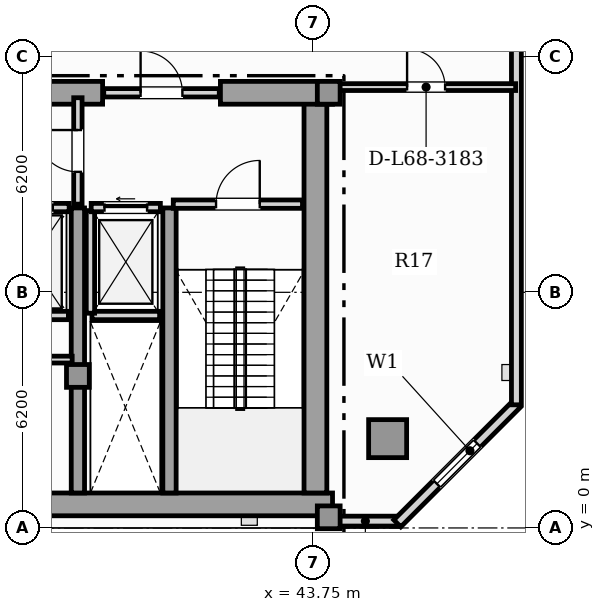
"""IFC4 building model, lengths in metres.
Left out: names, types, materials, properties, quantities, classifications, styles, units other than length and angle.
Written with IfcOpenShell. Run it as: python <this file> out.ifc"""

import sys

from ifc_helpers import new_model, si_unit, direction, frame, frame_2d, origin, origin_2d, place, context, subcontext, project, spatial, rectangle, hollow_rectangle, extrude, element, fill, save


model = new_model("IFC4")
c1 = context("Model", 3, precision=1e-05, world=origin(), true_north=direction((0.0, 1.0)))
c2 = subcontext(c1, "Body", "Model", "MODEL_VIEW")
j1 = project(units=[si_unit("LENGTHUNIT", "METRE"), si_unit("PLANEANGLEUNIT", "RADIAN")], contexts=[c1])
p1 = place(None, origin())
s1 = spatial("IfcSite", under=j1, at=p1, CompositionType="ELEMENT")
p2 = place(p1, origin())
s2 = spatial("IfcBuilding", under=s1, at=p2, CompositionType="ELEMENT")
p3 = place(p2, frame((0.0, 0.0, 276.0)))
s3 = spatial("IfcBuildingStorey", under=s2, at=p3, CompositionType="ELEMENT", Elevation=276.0)
p4 = place(p3, frame((13.25, 0.62, 0.0), z_axis=(0.0, 0.0, 1.0), x_axis=(1.0, 0.0, 0.0)))
e1 = element("IfcWall", 1, at=p4, inside=s3, PredefinedType="SHEAR", context=c2, shape_type="SweptSolid", body=[
    extrude(rectangle(XDim=31.0, YDim=0.6, at=frame_2d((15.5, 0.0))), origin(), (0.0, 0.0, 1.0), 4.85),
])
p5 = place(p3, frame((43.8, 0.92, 0.0), z_axis=(0.0, 0.0, 1.0), x_axis=(0.0, 1.0, 0.0)))
e2 = element("IfcWall", 2, at=p5, inside=s3, PredefinedType="SHEAR", context=c2, shape_type="SweptSolid", body=[
    extrude(rectangle(XDim=10.53, YDim=0.6, at=frame_2d((5.265, 0.0))), origin(), (0.0, 0.0, 1.0), 4.85),
])
p6 = place(p3, frame((30.9, 11.45, 0.0), z_axis=(0.0, 0.0, 1.0), x_axis=(1.0, 0.0, 0.0)))
e3 = element("IfcWall", 3, at=p6, inside=s3, PredefinedType="SHEAR", context=c2, shape_type="SweptSolid", body=[
    extrude(rectangle(XDim=7.3, YDim=0.6, at=frame_2d((3.65, 0.0))), origin(), (0.0, 0.0, 1.0), 4.85),
])
p7 = place(p3, frame((41.3, 11.45, 0.0), z_axis=(0.0, 0.0, 1.0), x_axis=(1.0, 0.0, 0.0)))
e4 = element("IfcWall", 4, at=p7, inside=s3, PredefinedType="SHEAR", context=c2, shape_type="SweptSolid", body=[
    extrude(rectangle(XDim=2.95, YDim=0.6, at=frame_2d((1.475, 0.0))), origin(), (0.0, 0.0, 1.0), 4.85),
])
for number, where, z_axis, x_axis in (
    (5, (37.55, 0.92, 0.0), (0.0, 0.0, 1.0), (0.0, 1.0, 0.0)),
    (6, (39.96, 0.92, 0.0), (0.0, 0.0, 1.0), (0.0, 1.0, 0.0)),
):
    element("IfcWall", number, at=place(p3, frame(where, z_axis=z_axis, x_axis=x_axis)), inside=s3, PredefinedType="SHEAR", context=c2, shape_type="SweptSolid", body=[
        extrude(rectangle(XDim=7.5, YDim=0.35, at=frame_2d((3.75, 0.0))), origin(), (0.0, 0.0, 1.0), 4.85),
    ])
for number, where, z_axis, x_axis in (
    (7, (44.15, 0.28, 0.0), (0.0, 0.0, 1.0), (1.0, 0.0, 0.0)),
    (8, (44.15, 11.45, 0.0), (0.0, 0.0, 1.0), (1.0, 0.0, 0.0)),
    (9, (37.55, 4.0, 0.0), (0.0, 0.0, 1.0), (1.0, 0.0, 0.0)),
):
    element("IfcColumn", number, at=place(p3, frame(where, z_axis=z_axis, x_axis=x_axis)), inside=s3, PredefinedType="COLUMN", context=c2, shape_type="SweptSolid", body=[
        extrude(rectangle(XDim=0.6, YDim=0.6, at=origin_2d()), origin(), (0.0, 0.0, 1.0), 5.05),
    ])
p8 = place(p3, frame((45.7, 2.35, 0.0), z_axis=(0.0, 0.0, 1.0), x_axis=(1.0, 0.0, 0.0)))
e10 = element("IfcColumn", 10, at=p8, inside=s3, PredefinedType="USERDEFINED", context=c2, shape_type="SweptSolid", body=[
    extrude(hollow_rectangle(XDim=1.0, YDim=1.0, WallThickness=0.06, at=origin_2d()), origin(), (0.0, 0.0, 1.0), 5.05),
])
p9 = place(p3, frame((44.25, 0.18, 0.0), z_axis=(0.0, 0.0, 1.0), x_axis=(1.0, 0.0, 0.0)))
e11 = element("IfcWall", 11, at=p9, inside=s3, PredefinedType="SOLIDWALL", context=c2, shape_type="SweptSolid", body=[
    extrude(rectangle(XDim=1.728, YDim=0.26, at=frame_2d((0.864, 0.0))), origin(), (0.0, 0.0, 1.0), 4.85),
])
p10 = place(p3, frame((45.954, 0.12, 0.0), z_axis=(0.0, 0.0, 1.0), x_axis=(0.707106781187, 0.707106781187, 0.0)))
e12 = element("IfcWall", 12, at=p10, inside=s3, PredefinedType="SOLIDWALL", context=c2, shape_type="SweptSolid", body=[
    extrude(rectangle(XDim=4.446, YDim=0.26, at=frame_2d((2.223, 0.0))), origin(), (0.0, 0.0, 1.0), 4.85),
])
p11 = place(p10, frame((1.473, 0.0, 0.9)))
e13 = element("IfcOpeningElement", 13, at=p11, cuts=e12, PredefinedType="OPENING", context=c2, shape_type="SweptSolid", body=[
    extrude(rectangle(XDim=1.5, YDim=1.95, at=frame_2d((0.75, 0.975))), frame((0.0, 0.14, 0.0), z_axis=(0.0, -1.0, 0.0), x_axis=(1.0, 0.0, 0.0)), (0.0, 0.0, 1.0), 0.28),
])
p12 = place(p3, frame((49.088, 3.24, 0.0), z_axis=(0.0, 0.0, 1.0), x_axis=(0.0, 1.0, 0.0)))
e14 = element("IfcWall", 14, at=p12, inside=s3, PredefinedType="SOLIDWALL", context=c2, shape_type="SweptSolid", body=[
    extrude(rectangle(XDim=15.289, YDim=0.26, at=frame_2d((7.645, 0.0))), origin(), (0.0, 0.0, 1.0), 4.85),
])
p13 = place(p12, frame((12.739, 0.0, 0.95)))
e15 = element("IfcOpeningElement", 15, at=p13, cuts=e14, PredefinedType="OPENING", context=c2, shape_type="SweptSolid", body=[
    extrude(rectangle(XDim=0.9, YDim=1.5, at=frame_2d((0.45, 0.75))), frame((0.0, 0.14, 0.0), z_axis=(0.0, -1.0, 0.0), x_axis=(1.0, 0.0, 0.0)), (0.0, 0.0, 1.0), 0.28),
])
p14 = place(p3, frame((37.92, 5.59, 0.0), z_axis=(0.0, 0.0, 1.0), x_axis=(1.0, 0.0, 0.0)))
e16 = element("IfcWall", 16, at=p14, inside=s3, PredefinedType="SOLIDWALL", context=c2, shape_type="SweptSolid", body=[
    extrude(rectangle(XDim=1.78, YDim=0.22, at=frame_2d((0.89, 0.0))), origin(), (0.0, 0.0, 1.0), 4.85),
])
p15 = place(p3, frame((37.88, 5.65, 0.0), z_axis=(0.0, 0.0, 1.0), x_axis=(0.0, 1.0, 0.0)))
e17 = element("IfcWall", 17, at=p15, inside=s3, PredefinedType="SOLIDWALL", context=c2, shape_type="SweptSolid", body=[
    extrude(rectangle(XDim=2.7, YDim=0.22, at=frame_2d((1.35, 0.0))), origin(), (0.0, 0.0, 1.0), 4.85),
])
p16 = place(p3, frame((37.9, 8.43, 0.0), z_axis=(0.0, 0.0, 1.0), x_axis=(1.0, 0.0, 0.0)))
e18 = element("IfcWall", 18, at=p16, inside=s3, PredefinedType="SOLIDWALL", context=c2, shape_type="SweptSolid", body=[
    extrude(rectangle(XDim=1.82, YDim=0.22, at=frame_2d((0.91, 0.0))), origin(), (0.0, 0.0, 1.0), 4.85),
])
p17 = place(p16, frame((0.35, 0.0, 0.0)))
e19 = element("IfcOpeningElement", 19, at=p17, cuts=e18, PredefinedType="OPENING", context=c2, shape_type="SweptSolid", body=[
    extrude(rectangle(XDim=1.12, YDim=2.25, at=frame_2d((0.56, 1.125))), frame((0.0, 0.12, 0.0), z_axis=(0.0, -1.0, 0.0), x_axis=(1.0, 0.0, 0.0)), (0.0, 0.0, 1.0), 0.24),
])
p18 = place(p3, frame((35.3, 5.59, 0.0), z_axis=(0.0, 0.0, 1.0), x_axis=(1.0, 0.0, 0.0)))
e20 = element("IfcWall", 20, at=p18, inside=s3, PredefinedType="SOLIDWALL", context=c2, shape_type="SweptSolid", body=[
    extrude(rectangle(XDim=2.0, YDim=0.22, at=frame_2d((1.0, 0.0))), origin(), (0.0, 0.0, 1.0), 4.85),
])
p19 = place(p3, frame((35.28, 8.43, 0.0), z_axis=(0.0, 0.0, 1.0), x_axis=(1.0, 0.0, 0.0)))
e21 = element("IfcWall", 21, at=p19, inside=s3, PredefinedType="SOLIDWALL", context=c2, shape_type="SweptSolid", body=[
    extrude(rectangle(XDim=2.04, YDim=0.22, at=frame_2d((1.02, 0.0))), origin(), (0.0, 0.0, 1.0), 4.85),
])
p20 = place(p19, frame((0.43, 0.0, 0.0)))
e22 = element("IfcOpeningElement", 22, at=p20, cuts=e21, PredefinedType="OPENING", context=c2, shape_type="SweptSolid", body=[
    extrude(rectangle(XDim=1.18, YDim=2.2, at=frame_2d((0.59, 1.1))), frame((0.0, 0.12, 0.0), z_axis=(0.0, -1.0, 0.0), x_axis=(1.0, 0.0, 0.0)), (0.0, 0.0, 1.0), 0.24),
])
p21 = place(p3, frame((40.06, 8.52, 0.0), z_axis=(0.0, 0.0, 1.0), x_axis=(1.0, 0.0, 0.0)))
e23 = element("IfcWall", 23, at=p21, inside=s3, PredefinedType="SOLIDWALL", context=c2, shape_type="SweptSolid", body=[
    extrude(rectangle(XDim=3.4, YDim=0.22, at=frame_2d((1.7, 0.0))), origin(), (0.0, 0.0, 1.0), 4.85),
])
p22 = place(p21, frame((1.125, 0.0, 0.0)))
e24 = element("IfcOpeningElement", 24, at=p22, cuts=e23, PredefinedType="OPENING", context=c2, shape_type="SweptSolid", body=[
    extrude(rectangle(XDim=1.15, YDim=2.2, at=frame_2d((0.575, 1.1))), frame((0.0, 0.12, 0.0), z_axis=(0.0, -1.0, 0.0), x_axis=(1.0, 0.0, 0.0)), (0.0, 0.0, 1.0), 0.24),
])
p23 = place(p3, frame((37.55, 8.52, 0.0), z_axis=(0.0, 0.0, 1.0), x_axis=(0.0, 1.0, 0.0)))
e25 = element("IfcWall", 25, at=p23, inside=s3, PredefinedType="SOLIDWALL", context=c2, shape_type="SweptSolid", body=[
    extrude(rectangle(XDim=2.8, YDim=0.22, at=frame_2d((1.4, 0.0))), origin(), (0.0, 0.0, 1.0), 4.305),
])
p24 = place(p23, frame((0.85, 0.0, 0.0)))
e26 = element("IfcOpeningElement", 26, at=p24, cuts=e25, PredefinedType="OPENING", context=c2, shape_type="SweptSolid", body=[
    extrude(rectangle(XDim=1.1, YDim=2.2, at=frame_2d((0.55, 1.1))), frame((0.0, 0.12, 0.0), z_axis=(0.0, -1.0, 0.0), x_axis=(1.0, 0.0, 0.0)), (0.0, 0.0, 1.0), 0.24),
])
p25 = place(p3, frame((38.23, 11.45, 0.0), z_axis=(0.0, 0.0, 1.0), x_axis=(1.0, 0.0, 0.0)))
e27 = element("IfcWall", 27, at=p25, inside=s3, PredefinedType="SOLIDWALL", context=c2, shape_type="SweptSolid", body=[
    extrude(rectangle(XDim=3.04, YDim=0.22, at=frame_2d((1.52, 0.0))), origin(), (0.0, 0.0, 1.0), 4.85),
])
p26 = place(p25, frame((0.97, 0.0, 0.0)))
e28 = element("IfcOpeningElement", 28, at=p26, cuts=e27, PredefinedType="OPENING", context=c2, shape_type="SweptSolid", body=[
    extrude(rectangle(XDim=1.1, YDim=2.2, at=frame_2d((0.55, 1.1))), frame((0.0, 0.12, 0.0), z_axis=(0.0, -1.0, 0.0), x_axis=(1.0, 0.0, 0.0)), (0.0, 0.0, 1.0), 0.24),
])
p27 = place(p3, frame((32.22, 4.43, 0.0), z_axis=(0.0, 0.0, 1.0), x_axis=(1.0, 0.0, 0.0)))
e29 = element("IfcWall", 29, at=p27, inside=s3, PredefinedType="PARTITIONING", context=c2, shape_type="SweptSolid", body=[
    extrude(rectangle(XDim=5.18, YDim=0.18, at=frame_2d((2.59, 0.0))), origin(), (0.0, 0.0, 1.0), 4.85),
])
p28 = place(p3, frame((44.355, 11.6, 0.0), z_axis=(0.0, 0.0, 1.0), x_axis=(1.0, 0.0, 0.0)))
e30 = element("IfcWall", 30, at=p28, inside=s3, PredefinedType="PARTITIONING", context=c2, shape_type="SweptSolid", body=[
    extrude(rectangle(XDim=4.714, YDim=0.18, at=frame_2d((2.357, 0.0))), origin(), (0.0, 0.0, 1.0), 4.85),
])
p29 = place(p28, frame((1.857, 0.0, 0.0)))
e31 = element("IfcOpeningElement", 31, at=p29, cuts=e30, PredefinedType="OPENING", context=c2, shape_type="SweptSolid", body=[
    extrude(rectangle(XDim=1.0, YDim=2.15, at=frame_2d((0.5, 1.075))), frame((0.0, 0.1, 0.0), z_axis=(0.0, -1.0, 0.0), x_axis=(1.0, 0.0, 0.0)), (0.0, 0.0, 1.0), 0.2),
])
p30 = place(p11, origin())
e32 = element("IfcWindow", 32, at=p30, inside=s3, PartitioningType="SINGLE_PANEL", PredefinedType="WINDOW", context=c2, shape_type="SweptSolid", body=[
    extrude(rectangle(XDim=1.5, YDim=1.95, at=frame_2d((0.75, 0.975))), frame((0.0, 0.03, 0.0), z_axis=(0.0, -1.0, 0.0), x_axis=(1.0, 0.0, 0.0)), (0.0, 0.0, 1.0), 0.06),
])
fill(e13, e32)
p31 = place(p17, origin())
e33 = element("IfcDoor", 33, at=p31, inside=s3, OperationType="SLIDING_TO_LEFT", PredefinedType="DOOR", context=c2, shape_type="SweptSolid", body=[
    extrude(rectangle(XDim=1.12, YDim=2.25, at=frame_2d((0.56, 1.125))), frame((0.0, 0.025, 0.0), z_axis=(0.0, -1.0, 0.0), x_axis=(1.0, 0.0, 0.0)), (0.0, 0.0, 1.0), 0.05),
])
fill(e19, e33)
p32 = place(p20, origin())
e34 = element("IfcDoor", 34, at=p32, inside=s3, OperationType="SLIDING_TO_RIGHT", PredefinedType="DOOR", context=c2, shape_type="SweptSolid", body=[
    extrude(rectangle(XDim=1.18, YDim=2.2, at=frame_2d((0.59, 1.1))), frame((0.0, 0.025, 0.0), z_axis=(0.0, -1.0, 0.0), x_axis=(1.0, 0.0, 0.0)), (0.0, 0.0, 1.0), 0.05),
])
fill(e22, e34)
p33 = place(p22, origin())
e35 = element("IfcDoor", 35, at=p33, inside=s3, OperationType="SINGLE_SWING_RIGHT", PredefinedType="DOOR", context=c2, shape_type="SweptSolid", body=[
    extrude(rectangle(XDim=1.15, YDim=2.2, at=frame_2d((0.575, 1.1))), frame((0.0, 0.025, 0.0), z_axis=(0.0, -1.0, 0.0), x_axis=(1.0, 0.0, 0.0)), (0.0, 0.0, 1.0), 0.05),
])
fill(e24, e35)
p34 = place(p24, origin())
e36 = element("IfcDoor", 36, at=p34, inside=s3, OperationType="SINGLE_SWING_RIGHT", PredefinedType="DOOR", context=c2, shape_type="SweptSolid", body=[
    extrude(rectangle(XDim=1.1, YDim=2.2, at=frame_2d((0.55, 1.1))), frame((0.0, 0.025, 0.0), z_axis=(0.0, -1.0, 0.0), x_axis=(1.0, 0.0, 0.0)), (0.0, 0.0, 1.0), 0.05),
])
fill(e26, e36)
p35 = place(p26, origin())
e37 = element("IfcDoor", 37, at=p35, inside=s3, OperationType="SINGLE_SWING_LEFT", PredefinedType="DOOR", context=c2, shape_type="SweptSolid", body=[
    extrude(rectangle(XDim=1.1, YDim=2.2, at=frame_2d((0.55, 1.1))), frame((0.0, 0.025, 0.0), z_axis=(0.0, -1.0, 0.0), x_axis=(1.0, 0.0, 0.0)), (0.0, 0.0, 1.0), 0.05),
])
fill(e28, e37)
p36 = place(p29, origin())
e38 = element("IfcDoor", 38, at=p36, inside=s3, OperationType="SINGLE_SWING_LEFT", PredefinedType="DOOR", context=c2, shape_type="SweptSolid", body=[
    extrude(rectangle(XDim=1.0, YDim=2.15, at=frame_2d((0.5, 1.075))), frame((0.0, 0.025, 0.0), z_axis=(0.0, -1.0, 0.0), x_axis=(1.0, 0.0, 0.0)), (0.0, 0.0, 1.0), 0.05),
])
fill(e31, e38)
save(model, sys.argv[1])
